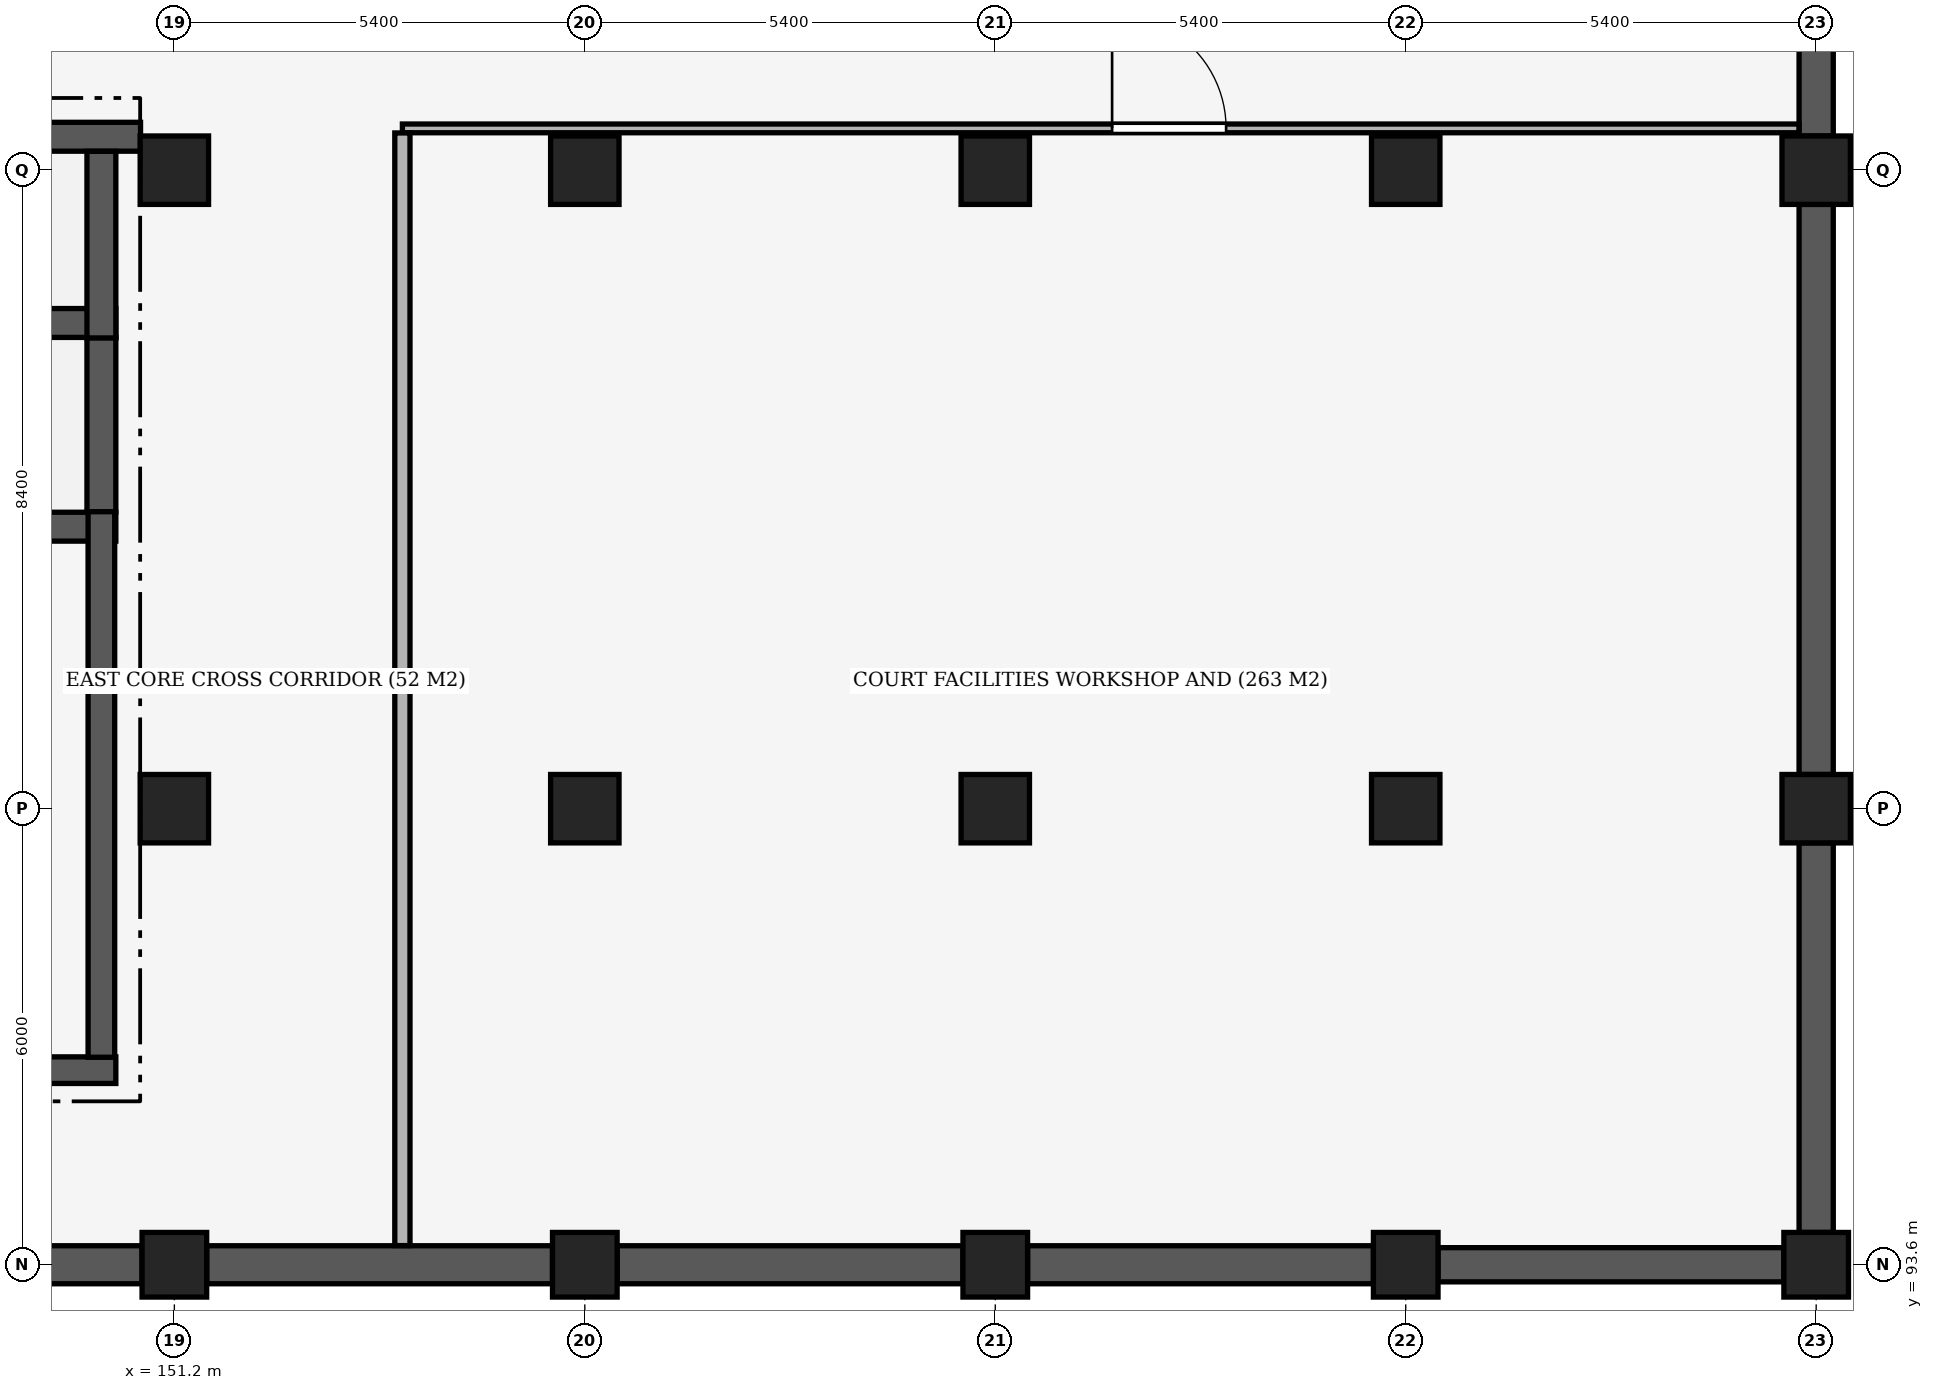
"""IFC4 building model, lengths in metres.
Left out: names, types, materials, properties, quantities, classifications, styles, units other than length and angle.
Written with IfcOpenShell. Run it as: python <this file> out.ifc"""

import sys

from ifc_helpers import new_model, si_unit, direction, frame, frame_2d, origin, origin_2d, place, context, subcontext, project, spatial, rectangle, extrude, element, fill, save


model = new_model("IFC4")
c1 = context("Model", 3, precision=1e-05, world=origin(), true_north=direction((0.0, 1.0)))
c2 = subcontext(c1, "Body", "Model", "MODEL_VIEW")
j1 = project(units=[si_unit("LENGTHUNIT", "METRE"), si_unit("PLANEANGLEUNIT", "RADIAN")], contexts=[c1])
p1 = place(None, origin())
s1 = spatial("IfcSite", under=j1, at=p1, CompositionType="ELEMENT")
p2 = place(p1, origin())
s2 = spatial("IfcBuilding", under=s1, at=p2, CompositionType="ELEMENT")
p3 = place(p2, frame((0.0, 0.0, -4.8)))
s3 = spatial("IfcBuildingStorey", under=s2, at=p3, CompositionType="ELEMENT", Elevation=-4.8)
p4 = place(p3, frame((151.2, 93.6, 0.0), z_axis=(0.0, 0.0, 1.0), x_axis=(1.0, 0.0, 0.0)))
e1 = element("IfcColumn", 1, at=p4, inside=s3, PredefinedType="COLUMN", context=c2, shape_type="SweptSolid", body=[
    extrude(rectangle(XDim=0.85, YDim=0.85, at=origin_2d()), origin(), (0.0, 0.0, 1.0), 4.8),
])
for number, where, z_axis, x_axis in (
    (2, (151.2, 99.6, 0.0), (0.0, 0.0, 1.0), (1.0, 0.0, 0.0)),
    (3, (151.2, 108.0, 0.0), (0.0, 0.0, 1.0), (1.0, 0.0, 0.0)),
):
    element("IfcColumn", number, at=place(p3, frame(where, z_axis=z_axis, x_axis=x_axis)), inside=s3, PredefinedType="COLUMN", context=c2, shape_type="SweptSolid", body=[
        extrude(rectangle(XDim=0.9, YDim=0.9, at=origin_2d()), origin(), (0.0, 0.0, 1.0), 4.8),
    ])
p5 = place(p3, frame((156.6, 93.6, 0.0), z_axis=(0.0, 0.0, 1.0), x_axis=(1.0, 0.0, 0.0)))
e4 = element("IfcColumn", 4, at=p5, inside=s3, PredefinedType="COLUMN", context=c2, shape_type="SweptSolid", body=[
    extrude(rectangle(XDim=0.85, YDim=0.85, at=origin_2d()), origin(), (0.0, 0.0, 1.0), 4.8),
])
for number, where, z_axis, x_axis in (
    (5, (156.6, 99.6, 0.0), (0.0, 0.0, 1.0), (1.0, 0.0, 0.0)),
    (6, (156.6, 108.0, 0.0), (0.0, 0.0, 1.0), (1.0, 0.0, 0.0)),
):
    element("IfcColumn", number, at=place(p3, frame(where, z_axis=z_axis, x_axis=x_axis)), inside=s3, PredefinedType="COLUMN", context=c2, shape_type="SweptSolid", body=[
        extrude(rectangle(XDim=0.9, YDim=0.9, at=origin_2d()), origin(), (0.0, 0.0, 1.0), 4.8),
    ])
p6 = place(p3, frame((162.0, 93.6, 0.0), z_axis=(0.0, 0.0, 1.0), x_axis=(1.0, 0.0, 0.0)))
e7 = element("IfcColumn", 7, at=p6, inside=s3, PredefinedType="COLUMN", context=c2, shape_type="SweptSolid", body=[
    extrude(rectangle(XDim=0.85, YDim=0.85, at=origin_2d()), origin(), (0.0, 0.0, 1.0), 4.8),
])
for number, where, z_axis, x_axis in (
    (8, (162.0, 99.6, 0.0), (0.0, 0.0, 1.0), (1.0, 0.0, 0.0)),
    (9, (162.0, 108.0, 0.0), (0.0, 0.0, 1.0), (1.0, 0.0, 0.0)),
):
    element("IfcColumn", number, at=place(p3, frame(where, z_axis=z_axis, x_axis=x_axis)), inside=s3, PredefinedType="COLUMN", context=c2, shape_type="SweptSolid", body=[
        extrude(rectangle(XDim=0.9, YDim=0.9, at=origin_2d()), origin(), (0.0, 0.0, 1.0), 4.8),
    ])
p7 = place(p3, frame((167.4, 93.6, 0.0), z_axis=(0.0, 0.0, 1.0), x_axis=(1.0, 0.0, 0.0)))
e10 = element("IfcColumn", 10, at=p7, inside=s3, PredefinedType="COLUMN", context=c2, shape_type="SweptSolid", body=[
    extrude(rectangle(XDim=0.85, YDim=0.85, at=origin_2d()), origin(), (0.0, 0.0, 1.0), 4.8),
])
for number, where, z_axis, x_axis in (
    (11, (167.4, 99.6, 0.0), (0.0, 0.0, 1.0), (1.0, 0.0, 0.0)),
    (12, (167.4, 108.0, 0.0), (0.0, 0.0, 1.0), (1.0, 0.0, 0.0)),
):
    element("IfcColumn", number, at=place(p3, frame(where, z_axis=z_axis, x_axis=x_axis)), inside=s3, PredefinedType="COLUMN", context=c2, shape_type="SweptSolid", body=[
        extrude(rectangle(XDim=0.9, YDim=0.9, at=origin_2d()), origin(), (0.0, 0.0, 1.0), 4.8),
    ])
p8 = place(p3, frame((172.8, 93.6, 0.0), z_axis=(0.0, 0.0, 1.0), x_axis=(1.0, 0.0, 0.0)))
e13 = element("IfcColumn", 13, at=p8, inside=s3, PredefinedType="COLUMN", context=c2, shape_type="SweptSolid", body=[
    extrude(rectangle(XDim=0.85, YDim=0.85, at=origin_2d()), origin(), (0.0, 0.0, 1.0), 4.8),
])
for number, where, z_axis, x_axis in (
    (14, (172.8, 99.6, 0.0), (0.0, 0.0, 1.0), (1.0, 0.0, 0.0)),
    (15, (172.8, 108.0, 0.0), (0.0, 0.0, 1.0), (1.0, 0.0, 0.0)),
):
    element("IfcColumn", number, at=place(p3, frame(where, z_axis=z_axis, x_axis=x_axis)), inside=s3, PredefinedType="COLUMN", context=c2, shape_type="SweptSolid", body=[
        extrude(rectangle(XDim=0.9, YDim=0.9, at=origin_2d()), origin(), (0.0, 0.0, 1.0), 4.8),
    ])
p9 = place(p3, frame((172.8, 112.95, 0.0), z_axis=(0.0, 0.0, 1.0), x_axis=(0.0, -1.0, 0.0)))
e16 = element("IfcWall", 16, at=p9, inside=s3, PredefinedType="USERDEFINED", context=c2, shape_type="SweptSolid", body=[
    extrude(rectangle(XDim=4.5, YDim=0.45, at=frame_2d((2.25, 0.0))), origin(), (0.0, 0.0, 1.0), 3.85),
])
p10 = place(p3, frame((172.8, 107.55, 0.0), z_axis=(0.0, 0.0, 1.0), x_axis=(0.0, -1.0, 0.0)))
e17 = element("IfcWall", 17, at=p10, inside=s3, PredefinedType="USERDEFINED", context=c2, shape_type="SweptSolid", body=[
    extrude(rectangle(XDim=7.5, YDim=0.45, at=frame_2d((3.75, 0.0))), origin(), (0.0, 0.0, 1.0), 3.7),
])
p11 = place(p3, frame((172.8, 99.15, 0.0), z_axis=(0.0, 0.0, 1.0), x_axis=(0.0, -1.0, 0.0)))
e18 = element("IfcWall", 18, at=p11, inside=s3, PredefinedType="USERDEFINED", context=c2, shape_type="SweptSolid", body=[
    extrude(rectangle(XDim=5.125, YDim=0.45, at=frame_2d((2.562, 0.0))), origin(), (0.0, 0.0, 1.0), 3.85),
])
p12 = place(p3, frame((172.375, 93.6, 0.0), z_axis=(0.0, 0.0, 1.0), x_axis=(-1.0, 0.0, 0.0)))
e19 = element("IfcWall", 19, at=p12, inside=s3, PredefinedType="USERDEFINED", context=c2, shape_type="SweptSolid", body=[
    extrude(rectangle(XDim=4.55, YDim=0.45, at=frame_2d((2.275, 0.0))), origin(), (0.0, 0.0, 1.0), 3.9),
])
for number, where, z_axis, x_axis in (
    (20, (166.975, 93.6, 0.0), (0.0, 0.0, 1.0), (-1.0, 0.0, 0.0)),
    (21, (161.575, 93.6, 0.0), (0.0, 0.0, 1.0), (-1.0, 0.0, 0.0)),
    (22, (156.175, 93.6, 0.0), (0.0, 0.0, 1.0), (-1.0, 0.0, 0.0)),
):
    element("IfcWall", number, at=place(p3, frame(where, z_axis=z_axis, x_axis=x_axis)), inside=s3, PredefinedType="USERDEFINED", context=c2, shape_type="SweptSolid", body=[
        extrude(rectangle(XDim=4.55, YDim=0.5, at=frame_2d((2.275, 0.0))), origin(), (0.0, 0.0, 1.0), 3.9),
    ])
p13 = place(p3, frame((150.775, 93.6, 0.0), z_axis=(0.0, 0.0, 1.0), x_axis=(-1.0, 0.0, 0.0)))
e23 = element("IfcWall", 23, at=p13, inside=s3, PredefinedType="USERDEFINED", context=c2, shape_type="SweptSolid", body=[
    extrude(rectangle(XDim=7.55, YDim=0.5, at=frame_2d((3.775, 0.0))), origin(), (0.0, 0.0, 1.0), 3.8),
])
p14 = place(p3, frame((147.513, 103.31, 0.0), z_axis=(0.0, 0.0, 1.0), x_axis=(1.0, 0.0, 0.0)))
e24 = element("IfcWall", 24, at=p14, inside=s3, PredefinedType="SHEAR", context=c2, shape_type="SweptSolid", body=[
    extrude(rectangle(XDim=2.917, YDim=0.38, at=frame_2d((1.458, 0.0))), origin(), (0.0, 0.0, 1.0), 4.5),
])
p15 = place(p3, frame((147.17, 105.99, 0.0), z_axis=(0.0, 0.0, 1.0), x_axis=(1.0, 0.0, 0.0)))
e25 = element("IfcWall", 25, at=p15, inside=s3, PredefinedType="SHEAR", context=c2, shape_type="SweptSolid", body=[
    extrude(rectangle(XDim=3.26, YDim=0.38, at=frame_2d((1.63, 0.0))), origin(), (0.0, 0.0, 1.0), 4.5),
])
p16 = place(p3, frame((150.24, 103.502, 0.0), z_axis=(0.0, 0.0, 1.0), x_axis=(0.0, 1.0, 0.0)))
e26 = element("IfcWall", 26, at=p16, inside=s3, PredefinedType="SHEAR", context=c2, shape_type="SweptSolid", body=[
    extrude(rectangle(XDim=2.296, YDim=0.38, at=frame_2d((1.148, 0.0))), origin(), (0.0, 0.0, 1.0), 4.5),
])
p17 = place(p3, frame((147.17, 108.44, 0.0), z_axis=(0.0, 0.0, 1.0), x_axis=(1.0, 0.0, 0.0)))
e27 = element("IfcWall", 27, at=p17, inside=s3, PredefinedType="SHEAR", context=c2, shape_type="SweptSolid", body=[
    extrude(rectangle(XDim=3.585, YDim=0.38, at=frame_2d((1.792, 0.0))), origin(), (0.0, 0.0, 1.0), 4.5),
])
p18 = place(p3, frame((150.24, 105.793, 0.0), z_axis=(0.0, 0.0, 1.0), x_axis=(0.0, 1.0, 0.0)))
e28 = element("IfcWall", 28, at=p18, inside=s3, PredefinedType="SHEAR", context=c2, shape_type="SweptSolid", body=[
    extrude(rectangle(XDim=2.455, YDim=0.38, at=frame_2d((1.228, 0.0))), origin(), (0.0, 0.0, 1.0), 4.5),
])
p19 = place(p3, frame((147.58, 96.16, 0.0), z_axis=(0.0, 0.0, 1.0), x_axis=(1.0, 0.0, 0.0)))
e29 = element("IfcWall", 29, at=p19, inside=s3, PredefinedType="SHEAR", context=c2, shape_type="SweptSolid", body=[
    extrude(rectangle(XDim=2.85, YDim=0.35, at=frame_2d((1.425, 0.0))), origin(), (0.0, 0.0, 1.0), 4.5),
])
p20 = place(p3, frame((150.24, 96.33, 0.0), z_axis=(0.0, 0.0, 1.0), x_axis=(0.0, 1.0, 0.0)))
e30 = element("IfcWall", 30, at=p20, inside=s3, PredefinedType="SHEAR", context=c2, shape_type="SweptSolid", body=[
    extrude(rectangle(XDim=7.177, YDim=0.35, at=frame_2d((3.588, 0.0))), origin(), (0.0, 0.0, 1.0), 4.5),
])
p21 = place(p3, frame((154.2, 108.55, 0.0), z_axis=(0.0, 0.0, 1.0), x_axis=(1.0, 0.0, 0.0)))
e31 = element("IfcWall", 31, at=p21, inside=s3, PredefinedType="PARTITIONING", context=c2, shape_type="SweptSolid", body=[
    extrude(rectangle(XDim=18.373, YDim=0.115, at=frame_2d((9.187, 0.0))), origin(), (0.0, 0.0, 1.0), 3.85),
])
p22 = place(p21, frame((9.337, 0.0, 0.0)))
e32 = element("IfcOpeningElement", 32, at=p22, cuts=e31, PredefinedType="OPENING", context=c2, shape_type="SweptSolid", body=[
    extrude(rectangle(XDim=1.5, YDim=2.2, at=frame_2d((0.75, 1.1))), frame((0.0, 0.072, 0.0), z_axis=(0.0, -1.0, 0.0), x_axis=(1.0, 0.0, 0.0)), (0.0, 0.0, 1.0), 0.145),
])
p23 = place(p3, frame((154.2, 93.852, 0.0), z_axis=(0.0, 0.0, 1.0), x_axis=(0.0, 1.0, 0.0)))
e33 = element("IfcWall", 33, at=p23, inside=s3, PredefinedType="PARTITIONING", context=c2, shape_type="SweptSolid", body=[
    extrude(rectangle(XDim=14.638, YDim=0.2, at=frame_2d((7.319, 0.0))), origin(), (0.0, 0.0, 1.0), 3.9),
])
p24 = place(p22, origin())
e34 = element("IfcDoor", 34, at=p24, inside=s3, OperationType="SINGLE_SWING_LEFT", PredefinedType="DOOR", context=c2, shape_type="SweptSolid", body=[
    extrude(rectangle(XDim=1.5, YDim=2.2, at=frame_2d((0.75, 1.1))), frame((0.0, 0.025, 0.0), z_axis=(0.0, -1.0, 0.0), x_axis=(1.0, 0.0, 0.0)), (0.0, 0.0, 1.0), 0.05),
])
fill(e32, e34)
save(model, sys.argv[1])
